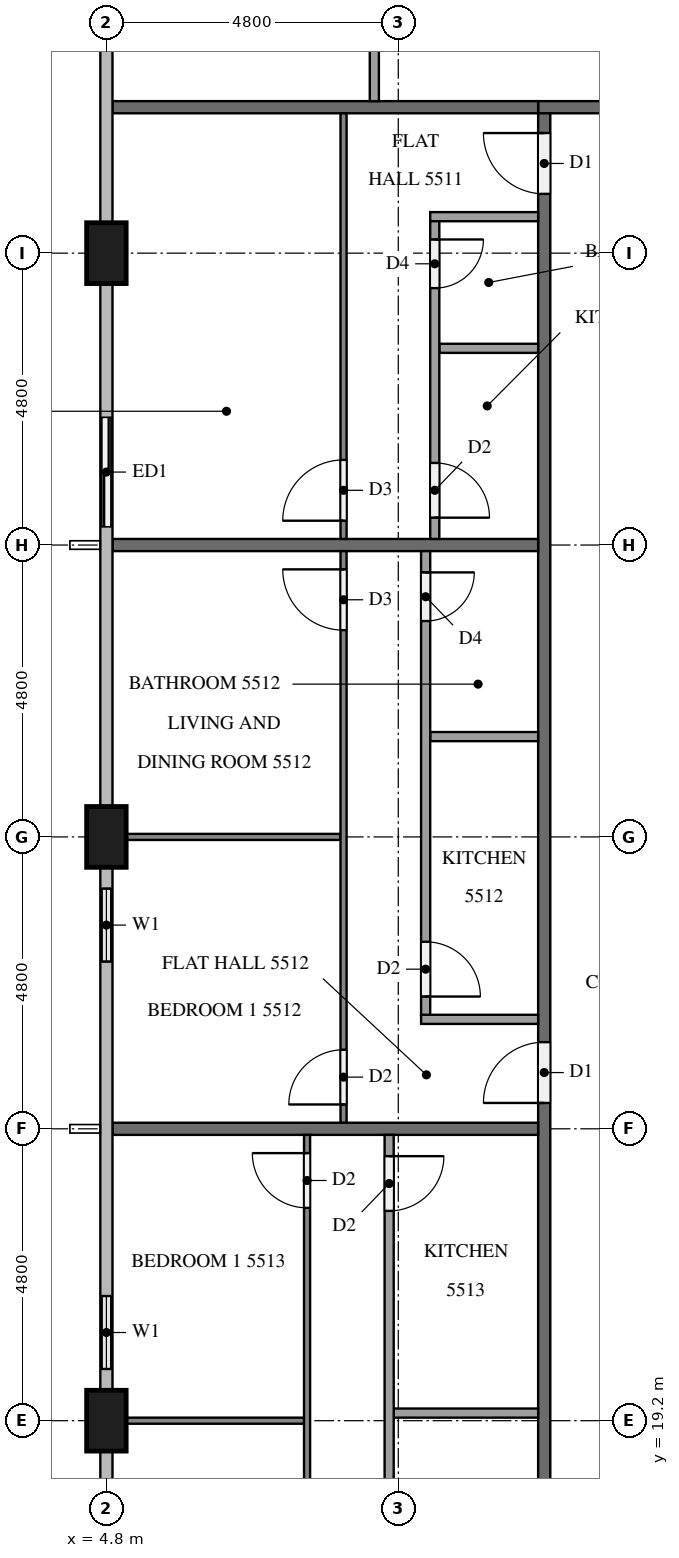
"""IFC4 building model, lengths in metres.
Left out: names, types, materials, properties, quantities, classifications, styles, units other than length and angle.
Written with IfcOpenShell. Run it as: python <this file> out.ifc"""

import sys

from ifc_helpers import new_model, si_unit, direction, frame, frame_2d, origin, origin_2d, place, context, subcontext, project, spatial, rectangle, extrude, element, fill, save


model = new_model("IFC4")
c1 = context("Model", 3, precision=1e-05, world=origin(), true_north=direction((0.0, 1.0)))
c2 = subcontext(c1, "Body", "Model", "MODEL_VIEW")
j1 = project(units=[si_unit("LENGTHUNIT", "METRE"), si_unit("PLANEANGLEUNIT", "RADIAN")], contexts=[c1])
p1 = place(None, origin())
s1 = spatial("IfcSite", under=j1, at=p1, CompositionType="ELEMENT")
p2 = place(p1, origin())
s2 = spatial("IfcBuilding", under=s1, at=p2, CompositionType="ELEMENT")
p3 = place(p2, frame((0.0, 0.0, 212.3)))
s3 = spatial("IfcBuildingStorey", under=s2, at=p3, CompositionType="ELEMENT", Elevation=212.3)
for number, where, z_axis, x_axis in (
    (1, (4.8, 38.4, 0.0), (0.0, 0.0, 1.0), (0.0, 1.0, 0.0)),
    (2, (4.8, 28.8, 0.0), (0.0, 0.0, 1.0), (0.0, 1.0, 0.0)),
    (3, (4.8, 19.2, 0.0), (0.0, 0.0, 1.0), (0.0, 1.0, 0.0)),
):
    element("IfcColumn", number, at=place(p3, frame(where, z_axis=z_axis, x_axis=x_axis)), inside=s3, PredefinedType="COLUMN", context=c2, shape_type="SweptSolid", body=[
        extrude(rectangle(XDim=1.0, YDim=0.65, at=origin_2d()), origin(), (0.0, 0.0, 1.0), 3.2),
    ])
p4 = place(p3, frame((4.8, 36.0, 0.0), z_axis=(0.0, 0.0, 1.0), x_axis=(0.0, -1.0, 0.0)))
e4 = element("IfcWall", 4, at=p4, inside=s3, PredefinedType="SOLIDWALL", context=c2, shape_type="SweptSolid", body=[
    extrude(rectangle(XDim=2.4, YDim=0.15, at=frame_2d((1.2, 0.0))), origin(), (0.0, 0.0, 1.0), 3.2),
])
p5 = place(p4, frame((0.3, 0.0, 0.0)))
e5 = element("IfcOpeningElement", 5, at=p5, cuts=e4, PredefinedType="OPENING", context=c2, shape_type="SweptSolid", body=[
    extrude(rectangle(XDim=1.8, YDim=2.4, at=frame_2d((0.9, 1.2))), frame((0.0, 0.085, 0.0), z_axis=(0.0, -1.0, 0.0), x_axis=(1.0, 0.0, 0.0)), (0.0, 0.0, 1.0), 0.17),
])
p6 = place(p3, frame((4.8, 28.3, 0.0), z_axis=(0.0, 0.0, 1.0), x_axis=(0.0, -1.0, 0.0)))
e6 = element("IfcWall", 6, at=p6, inside=s3, PredefinedType="SOLIDWALL", context=c2, shape_type="SweptSolid", body=[
    extrude(rectangle(XDim=1.9, YDim=0.15, at=frame_2d((0.95, 0.0))), origin(), (0.0, 0.0, 1.0), 3.2),
])
p7 = place(p6, frame((0.35, 0.0, 0.9)))
e7 = element("IfcOpeningElement", 7, at=p7, cuts=e6, PredefinedType="OPENING", context=c2, shape_type="SweptSolid", body=[
    extrude(rectangle(XDim=1.2, YDim=1.4, at=frame_2d((0.6, 0.7))), frame((0.0, 0.085, 0.0), z_axis=(0.0, -1.0, 0.0), x_axis=(1.0, 0.0, 0.0)), (0.0, 0.0, 1.0), 0.17),
])
p8 = place(p3, frame((4.8, 21.6, 0.0), z_axis=(0.0, 0.0, 1.0), x_axis=(0.0, -1.0, 0.0)))
e8 = element("IfcWall", 8, at=p8, inside=s3, PredefinedType="SOLIDWALL", context=c2, shape_type="SweptSolid", body=[
    extrude(rectangle(XDim=1.9, YDim=0.15, at=frame_2d((0.95, 0.0))), origin(), (0.0, 0.0, 1.0), 3.2),
])
p9 = place(p8, frame((0.35, 0.0, 0.9)))
e9 = element("IfcOpeningElement", 9, at=p9, cuts=e8, PredefinedType="OPENING", context=c2, shape_type="SweptSolid", body=[
    extrude(rectangle(XDim=1.2, YDim=1.4, at=frame_2d((0.6, 0.7))), frame((0.0, 0.085, 0.0), z_axis=(0.0, -1.0, 0.0), x_axis=(1.0, 0.0, 0.0)), (0.0, 0.0, 1.0), 0.17),
])
p10 = place(p3, frame((11.9, 40.8, 0.0), z_axis=(0.0, 0.0, 1.0), x_axis=(1.0, 0.0, 0.0)))
e10 = element("IfcWall", 10, at=p10, inside=s3, PredefinedType="PARTITIONING", context=c2, shape_type="SweptSolid", body=[
    extrude(rectangle(XDim=38.6, YDim=0.2, at=frame_2d((19.3, 0.0))), origin(), (0.0, 0.0, 1.0), 3.2),
])
p11 = place(p10, frame((36.525, 0.0, 0.0)))
e11 = element("IfcOpeningElement", 11, at=p11, cuts=e10, PredefinedType="OPENING", context=c2, shape_type="SweptSolid", body=[
    extrude(rectangle(XDim=1.0, YDim=2.1, at=frame_2d((0.5, 1.05))), frame((0.0, 0.11, 0.0), z_axis=(0.0, -1.0, 0.0), x_axis=(1.0, 0.0, 0.0)), (0.0, 0.0, 1.0), 0.22),
])
p12 = place(p10, frame((29.325, 0.0, 0.0)))
e12 = element("IfcOpeningElement", 12, at=p12, cuts=e10, PredefinedType="OPENING", context=c2, shape_type="SweptSolid", body=[
    extrude(rectangle(XDim=1.0, YDim=2.1, at=frame_2d((0.5, 1.05))), frame((0.0, 0.11, 0.0), z_axis=(0.0, -1.0, 0.0), x_axis=(1.0, 0.0, 0.0)), (0.0, 0.0, 1.0), 0.22),
])
p13 = place(p10, frame((12.525, 0.0, 0.0)))
e13 = element("IfcOpeningElement", 13, at=p13, cuts=e10, PredefinedType="OPENING", context=c2, shape_type="SweptSolid", body=[
    extrude(rectangle(XDim=1.0, YDim=2.1, at=frame_2d((0.5, 1.05))), frame((0.0, 0.11, 0.0), z_axis=(0.0, -1.0, 0.0), x_axis=(1.0, 0.0, 0.0)), (0.0, 0.0, 1.0), 0.22),
])
p14 = place(p10, frame((10.625, 0.0, 0.0)))
e14 = element("IfcOpeningElement", 14, at=p14, cuts=e10, PredefinedType="OPENING", context=c2, shape_type="SweptSolid", body=[
    extrude(rectangle(XDim=1.1, YDim=2.1, at=frame_2d((0.55, 1.05))), frame((0.0, 0.11, 0.0), z_axis=(0.0, -1.0, 0.0), x_axis=(1.0, 0.0, 0.0)), (0.0, 0.0, 1.0), 0.22),
])
p15 = place(p3, frame((12.0, 12.1, 0.0), z_axis=(0.0, 0.0, 1.0), x_axis=(0.0, 1.0, 0.0)))
e15 = element("IfcWall", 15, at=p15, inside=s3, PredefinedType="PARTITIONING", context=c2, shape_type="SweptSolid", body=[
    extrude(rectangle(XDim=28.6, YDim=0.2, at=frame_2d((14.3, 0.0))), origin(), (0.0, 0.0, 1.0), 3.2),
])
p16 = place(p15, frame((27.275, 0.0, 0.0)))
e16 = element("IfcOpeningElement", 16, at=p16, cuts=e15, PredefinedType="OPENING", context=c2, shape_type="SweptSolid", body=[
    extrude(rectangle(XDim=1.0, YDim=2.1, at=frame_2d((0.5, 1.05))), frame((0.0, 0.11, 0.0), z_axis=(0.0, -1.0, 0.0), x_axis=(1.0, 0.0, 0.0)), (0.0, 0.0, 1.0), 0.22),
])
p17 = place(p15, frame((12.325, 0.0, 0.0)))
e17 = element("IfcOpeningElement", 17, at=p17, cuts=e15, PredefinedType="OPENING", context=c2, shape_type="SweptSolid", body=[
    extrude(rectangle(XDim=1.0, YDim=2.1, at=frame_2d((0.5, 1.05))), frame((0.0, 0.11, 0.0), z_axis=(0.0, -1.0, 0.0), x_axis=(1.0, 0.0, 0.0)), (0.0, 0.0, 1.0), 0.22),
])
p18 = place(p15, frame((2.725, 0.0, 0.0)))
e18 = element("IfcOpeningElement", 18, at=p18, cuts=e15, PredefinedType="OPENING", context=c2, shape_type="SweptSolid", body=[
    extrude(rectangle(XDim=1.0, YDim=2.1, at=frame_2d((0.5, 1.05))), frame((0.0, 0.11, 0.0), z_axis=(0.0, -1.0, 0.0), x_axis=(1.0, 0.0, 0.0)), (0.0, 0.0, 1.0), 0.22),
])
p19 = place(p15, frame((0.875, 0.0, 0.0)))
e19 = element("IfcOpeningElement", 19, at=p19, cuts=e15, PredefinedType="OPENING", context=c2, shape_type="SweptSolid", body=[
    extrude(rectangle(XDim=1.0, YDim=2.1, at=frame_2d((0.5, 1.05))), frame((0.0, 0.11, 0.0), z_axis=(0.0, -1.0, 0.0), x_axis=(1.0, 0.0, 0.0)), (0.0, 0.0, 1.0), 0.22),
])
for number, where, z_axis, x_axis in (
    (20, (4.9, 40.8, 0.0), (0.0, 0.0, 1.0), (1.0, 0.0, 0.0)),
    (21, (4.9, 33.6, 0.0), (0.0, 0.0, 1.0), (1.0, 0.0, 0.0)),
    (22, (4.9, 24.0, 0.0), (0.0, 0.0, 1.0), (1.0, 0.0, 0.0)),
):
    element("IfcWall", number, at=place(p3, frame(where, z_axis=z_axis, x_axis=x_axis)), inside=s3, PredefinedType="PARTITIONING", context=c2, shape_type="SweptSolid", body=[
        extrude(rectangle(XDim=7.0, YDim=0.2, at=frame_2d((3.5, 0.0))), origin(), (0.0, 0.0, 1.0), 3.2),
    ])
p20 = place(p3, frame((9.206, 40.9, 0.0), z_axis=(0.0, 0.0, 1.0), x_axis=(0.0, 1.0, 0.0)))
e23 = element("IfcWall", 23, at=p20, inside=s3, PredefinedType="PARTITIONING", context=c2, shape_type="SweptSolid", body=[
    extrude(rectangle(XDim=3.125, YDim=0.15, at=frame_2d((1.562, 0.0))), origin(), (0.0, 0.0, 1.0), 3.2),
])
p21 = place(p3, frame((8.7, 33.7, 0.0), z_axis=(0.0, 0.0, 1.0), x_axis=(0.0, 1.0, 0.0)))
e24 = element("IfcWall", 24, at=p21, inside=s3, PredefinedType="PARTITIONING", context=c2, shape_type="SweptSolid", body=[
    extrude(rectangle(XDim=7.0, YDim=0.1, at=frame_2d((3.5, 0.0))), origin(), (0.0, 0.0, 1.0), 3.2),
])
p22 = place(p21, frame((0.3, 0.0, 0.0)))
e25 = element("IfcOpeningElement", 25, at=p22, cuts=e24, PredefinedType="OPENING", context=c2, shape_type="SweptSolid", body=[
    extrude(rectangle(XDim=1.0, YDim=2.1, at=frame_2d((0.5, 1.05))), frame((0.0, 0.06, 0.0), z_axis=(0.0, -1.0, 0.0), x_axis=(1.0, 0.0, 0.0)), (0.0, 0.0, 1.0), 0.12),
])
p23 = place(p3, frame((11.9, 36.835, 0.0), z_axis=(0.0, 0.0, 1.0), x_axis=(-1.0, 0.0, 0.0)))
e26 = element("IfcWall", 26, at=p23, inside=s3, PredefinedType="PARTITIONING", context=c2, shape_type="SweptSolid", body=[
    extrude(rectangle(XDim=1.625, YDim=0.15, at=frame_2d((0.812, 0.0))), origin(), (0.0, 0.0, 1.0), 3.2),
])
p24 = place(p3, frame((11.9, 39.0, 0.0), z_axis=(0.0, 0.0, 1.0), x_axis=(-1.0, 0.0, 0.0)))
e27 = element("IfcWall", 27, at=p24, inside=s3, PredefinedType="PARTITIONING", context=c2, shape_type="SweptSolid", body=[
    extrude(rectangle(XDim=1.775, YDim=0.15, at=frame_2d((0.887, 0.0))), origin(), (0.0, 0.0, 1.0), 3.2),
])
p25 = place(p3, frame((10.2, 38.925, 0.0), z_axis=(0.0, 0.0, 1.0), x_axis=(0.0, -1.0, 0.0)))
e28 = element("IfcWall", 28, at=p25, inside=s3, PredefinedType="PARTITIONING", context=c2, shape_type="SweptSolid", body=[
    extrude(rectangle(XDim=5.225, YDim=0.15, at=frame_2d((2.613, 0.0))), origin(), (0.0, 0.0, 1.0), 3.2),
])
p26 = place(p25, frame((0.3, 0.0, 0.0)))
e29 = element("IfcOpeningElement", 29, at=p26, cuts=e28, PredefinedType="OPENING", context=c2, shape_type="SweptSolid", body=[
    extrude(rectangle(XDim=0.8, YDim=2.1, at=frame_2d((0.4, 1.05))), frame((0.0, 0.085, 0.0), z_axis=(0.0, -1.0, 0.0), x_axis=(1.0, 0.0, 0.0)), (0.0, 0.0, 1.0), 0.17),
])
p27 = place(p25, frame((3.975, 0.0, 0.0)))
e30 = element("IfcOpeningElement", 30, at=p27, cuts=e28, PredefinedType="OPENING", context=c2, shape_type="SweptSolid", body=[
    extrude(rectangle(XDim=0.9, YDim=2.1, at=frame_2d((0.45, 1.05))), frame((0.0, 0.085, 0.0), z_axis=(0.0, -1.0, 0.0), x_axis=(1.0, 0.0, 0.0)), (0.0, 0.0, 1.0), 0.17),
])
p28 = place(p3, frame((8.65, 28.8, 0.0), z_axis=(0.0, 0.0, 1.0), x_axis=(-1.0, 0.0, 0.0)))
e31 = element("IfcWall", 31, at=p28, inside=s3, PredefinedType="PARTITIONING", context=c2, shape_type="SweptSolid", body=[
    extrude(rectangle(XDim=3.525, YDim=0.1, at=frame_2d((1.762, 0.0))), origin(), (0.0, 0.0, 1.0), 3.2),
])
p29 = place(p3, frame((8.7, 24.1, 0.0), z_axis=(0.0, 0.0, 1.0), x_axis=(0.0, 1.0, 0.0)))
e32 = element("IfcWall", 32, at=p29, inside=s3, PredefinedType="PARTITIONING", context=c2, shape_type="SweptSolid", body=[
    extrude(rectangle(XDim=9.4, YDim=0.1, at=frame_2d((4.7, 0.0))), origin(), (0.0, 0.0, 1.0), 3.2),
])
p30 = place(p29, frame((0.3, 0.0, 0.0)))
e33 = element("IfcOpeningElement", 33, at=p30, cuts=e32, PredefinedType="OPENING", context=c2, shape_type="SweptSolid", body=[
    extrude(rectangle(XDim=0.9, YDim=2.1, at=frame_2d((0.45, 1.05))), frame((0.0, 0.06, 0.0), z_axis=(0.0, -1.0, 0.0), x_axis=(1.0, 0.0, 0.0)), (0.0, 0.0, 1.0), 0.12),
])
p31 = place(p29, frame((8.1, 0.0, 0.0)))
e34 = element("IfcOpeningElement", 34, at=p31, cuts=e32, PredefinedType="OPENING", context=c2, shape_type="SweptSolid", body=[
    extrude(rectangle(XDim=1.0, YDim=2.1, at=frame_2d((0.5, 1.05))), frame((0.0, 0.06, 0.0), z_axis=(0.0, -1.0, 0.0), x_axis=(1.0, 0.0, 0.0)), (0.0, 0.0, 1.0), 0.12),
])
p32 = place(p3, frame((11.9, 30.45, 0.0), z_axis=(0.0, 0.0, 1.0), x_axis=(-1.0, 0.0, 0.0)))
e35 = element("IfcWall", 35, at=p32, inside=s3, PredefinedType="PARTITIONING", context=c2, shape_type="SweptSolid", body=[
    extrude(rectangle(XDim=1.775, YDim=0.15, at=frame_2d((0.887, 0.0))), origin(), (0.0, 0.0, 1.0), 3.2),
])
p33 = place(p3, frame((11.9, 25.8, 0.0), z_axis=(0.0, 0.0, 1.0), x_axis=(-1.0, 0.0, 0.0)))
e36 = element("IfcWall", 36, at=p33, inside=s3, PredefinedType="PARTITIONING", context=c2, shape_type="SweptSolid", body=[
    extrude(rectangle(XDim=1.925, YDim=0.15, at=frame_2d((0.962, 0.0))), origin(), (0.0, 0.0, 1.0), 3.2),
])
p34 = place(p3, frame((10.05, 33.5, 0.0), z_axis=(0.0, 0.0, 1.0), x_axis=(0.0, -1.0, 0.0)))
e37 = element("IfcWall", 37, at=p34, inside=s3, PredefinedType="PARTITIONING", context=c2, shape_type="SweptSolid", body=[
    extrude(rectangle(XDim=7.625, YDim=0.15, at=frame_2d((3.812, 0.0))), origin(), (0.0, 0.0, 1.0), 3.2),
])
p35 = place(p34, frame((6.425, 0.0, 0.0)))
e38 = element("IfcOpeningElement", 38, at=p35, cuts=e37, PredefinedType="OPENING", context=c2, shape_type="SweptSolid", body=[
    extrude(rectangle(XDim=0.9, YDim=2.1, at=frame_2d((0.45, 1.05))), frame((0.0, 0.085, 0.0), z_axis=(0.0, -1.0, 0.0), x_axis=(1.0, 0.0, 0.0)), (0.0, 0.0, 1.0), 0.17),
])
p36 = place(p34, frame((0.35, 0.0, 0.0)))
e39 = element("IfcOpeningElement", 39, at=p36, cuts=e37, PredefinedType="OPENING", context=c2, shape_type="SweptSolid", body=[
    extrude(rectangle(XDim=0.8, YDim=2.1, at=frame_2d((0.4, 1.05))), frame((0.0, 0.085, 0.0), z_axis=(0.0, -1.0, 0.0), x_axis=(1.0, 0.0, 0.0)), (0.0, 0.0, 1.0), 0.17),
])
p37 = place(p3, frame((8.05, 19.2, 0.0), z_axis=(0.0, 0.0, 1.0), x_axis=(-1.0, 0.0, 0.0)))
e40 = element("IfcWall", 40, at=p37, inside=s3, PredefinedType="PARTITIONING", context=c2, shape_type="SweptSolid", body=[
    extrude(rectangle(XDim=2.925, YDim=0.1, at=frame_2d((1.462, 0.0))), origin(), (0.0, 0.0, 1.0), 3.2),
])
p38 = place(p3, frame((8.1, 14.5, 0.0), z_axis=(0.0, 0.0, 1.0), x_axis=(0.0, 1.0, 0.0)))
e41 = element("IfcWall", 41, at=p38, inside=s3, PredefinedType="PARTITIONING", context=c2, shape_type="SweptSolid", body=[
    extrude(rectangle(XDim=9.4, YDim=0.1, at=frame_2d((4.7, 0.0))), origin(), (0.0, 0.0, 1.0), 3.2),
])
p39 = place(p38, frame((0.3, 0.0, 0.0)))
e42 = element("IfcOpeningElement", 42, at=p39, cuts=e41, PredefinedType="OPENING", context=c2, shape_type="SweptSolid", body=[
    extrude(rectangle(XDim=1.0, YDim=2.1, at=frame_2d((0.5, 1.05))), frame((0.0, 0.06, 0.0), z_axis=(0.0, -1.0, 0.0), x_axis=(1.0, 0.0, 0.0)), (0.0, 0.0, 1.0), 0.12),
])
p40 = place(p38, frame((8.2, 0.0, 0.0)))
e43 = element("IfcOpeningElement", 43, at=p40, cuts=e41, PredefinedType="OPENING", context=c2, shape_type="SweptSolid", body=[
    extrude(rectangle(XDim=0.9, YDim=2.1, at=frame_2d((0.45, 1.05))), frame((0.0, 0.06, 0.0), z_axis=(0.0, -1.0, 0.0), x_axis=(1.0, 0.0, 0.0)), (0.0, 0.0, 1.0), 0.12),
])
p41 = place(p3, frame((11.9, 19.325, 0.0), z_axis=(0.0, 0.0, 1.0), x_axis=(-1.0, 0.0, 0.0)))
e44 = element("IfcWall", 44, at=p41, inside=s3, PredefinedType="PARTITIONING", context=c2, shape_type="SweptSolid", body=[
    extrude(rectangle(XDim=2.375, YDim=0.15, at=frame_2d((1.188, 0.0))), origin(), (0.0, 0.0, 1.0), 3.2),
])
p42 = place(p3, frame((9.45, 23.9, 0.0), z_axis=(0.0, 0.0, 1.0), x_axis=(0.0, -1.0, 0.0)))
e45 = element("IfcWall", 45, at=p42, inside=s3, PredefinedType="PARTITIONING", context=c2, shape_type="SweptSolid", body=[
    extrude(rectangle(XDim=7.625, YDim=0.15, at=frame_2d((3.812, 0.0))), origin(), (0.0, 0.0, 1.0), 3.2),
])
p43 = place(p42, frame((6.525, 0.0, 0.0)))
e46 = element("IfcOpeningElement", 46, at=p43, cuts=e45, PredefinedType="OPENING", context=c2, shape_type="SweptSolid", body=[
    extrude(rectangle(XDim=0.8, YDim=2.1, at=frame_2d((0.4, 1.05))), frame((0.0, 0.085, 0.0), z_axis=(0.0, -1.0, 0.0), x_axis=(1.0, 0.0, 0.0)), (0.0, 0.0, 1.0), 0.17),
])
p44 = place(p42, frame((0.35, 0.0, 0.0)))
e47 = element("IfcOpeningElement", 47, at=p44, cuts=e45, PredefinedType="OPENING", context=c2, shape_type="SweptSolid", body=[
    extrude(rectangle(XDim=0.9, YDim=2.1, at=frame_2d((0.45, 1.05))), frame((0.0, 0.085, 0.0), z_axis=(0.0, -1.0, 0.0), x_axis=(1.0, 0.0, 0.0)), (0.0, 0.0, 1.0), 0.17),
])
p45 = place(p5, origin())
e48 = element("IfcDoor", 48, at=p45, inside=s3, OperationType="SLIDING_TO_LEFT", PredefinedType="DOOR", context=c2, shape_type="SweptSolid", body=[
    extrude(rectangle(XDim=1.8, YDim=2.4, at=frame_2d((0.9, 1.2))), frame((0.0, 0.025, 0.0), z_axis=(0.0, -1.0, 0.0), x_axis=(1.0, 0.0, 0.0)), (0.0, 0.0, 1.0), 0.05),
])
fill(e5, e48)
p46 = place(p7, origin())
e49 = element("IfcWindow", 49, at=p46, inside=s3, PartitioningType="SINGLE_PANEL", PredefinedType="WINDOW", context=c2, shape_type="SweptSolid", body=[
    extrude(rectangle(XDim=1.2, YDim=1.4, at=frame_2d((0.6, 0.7))), frame((0.0, 0.03, 0.0), z_axis=(0.0, -1.0, 0.0), x_axis=(1.0, 0.0, 0.0)), (0.0, 0.0, 1.0), 0.06),
])
fill(e7, e49)
p47 = place(p9, origin())
e50 = element("IfcWindow", 50, at=p47, inside=s3, PartitioningType="SINGLE_PANEL", PredefinedType="WINDOW", context=c2, shape_type="SweptSolid", body=[
    extrude(rectangle(XDim=1.2, YDim=1.4, at=frame_2d((0.6, 0.7))), frame((0.0, 0.03, 0.0), z_axis=(0.0, -1.0, 0.0), x_axis=(1.0, 0.0, 0.0)), (0.0, 0.0, 1.0), 0.06),
])
fill(e9, e50)
p48 = place(p16, origin())
e51 = element("IfcDoor", 51, at=p48, inside=s3, OperationType="SINGLE_SWING_RIGHT", PredefinedType="DOOR", context=c2, shape_type="SweptSolid", body=[
    extrude(rectangle(XDim=1.0, YDim=2.1, at=frame_2d((0.5, 1.05))), frame((0.0, 0.025, 0.0), z_axis=(0.0, -1.0, 0.0), x_axis=(1.0, 0.0, 0.0)), (0.0, 0.0, 1.0), 0.05),
])
fill(e16, e51)
p49 = place(p17, origin())
e52 = element("IfcDoor", 52, at=p49, inside=s3, OperationType="SINGLE_SWING_LEFT", PredefinedType="DOOR", context=c2, shape_type="SweptSolid", body=[
    extrude(rectangle(XDim=1.0, YDim=2.1, at=frame_2d((0.5, 1.05))), frame((0.0, 0.025, 0.0), z_axis=(0.0, -1.0, 0.0), x_axis=(1.0, 0.0, 0.0)), (0.0, 0.0, 1.0), 0.05),
])
fill(e17, e52)
p50 = place(p22, origin())
e53 = element("IfcDoor", 53, at=p50, inside=s3, OperationType="SINGLE_SWING_LEFT", PredefinedType="DOOR", context=c2, shape_type="SweptSolid", body=[
    extrude(rectangle(XDim=1.0, YDim=2.1, at=frame_2d((0.5, 1.05))), frame((0.0, 0.025, 0.0), z_axis=(0.0, -1.0, 0.0), x_axis=(1.0, 0.0, 0.0)), (0.0, 0.0, 1.0), 0.05),
])
fill(e25, e53)
p51 = place(p26, origin())
e54 = element("IfcDoor", 54, at=p51, inside=s3, OperationType="SINGLE_SWING_LEFT", PredefinedType="DOOR", context=c2, shape_type="SweptSolid", body=[
    extrude(rectangle(XDim=0.8, YDim=2.1, at=frame_2d((0.4, 1.05))), frame((0.0, 0.025, 0.0), z_axis=(0.0, -1.0, 0.0), x_axis=(1.0, 0.0, 0.0)), (0.0, 0.0, 1.0), 0.05),
])
fill(e29, e54)
p52 = place(p27, origin())
e55 = element("IfcDoor", 55, at=p52, inside=s3, OperationType="SINGLE_SWING_RIGHT", PredefinedType="DOOR", context=c2, shape_type="SweptSolid", body=[
    extrude(rectangle(XDim=0.9, YDim=2.1, at=frame_2d((0.45, 1.05))), frame((0.0, 0.025, 0.0), z_axis=(0.0, -1.0, 0.0), x_axis=(1.0, 0.0, 0.0)), (0.0, 0.0, 1.0), 0.05),
])
fill(e30, e55)
p53 = place(p30, origin())
e56 = element("IfcDoor", 56, at=p53, inside=s3, OperationType="SINGLE_SWING_LEFT", PredefinedType="DOOR", context=c2, shape_type="SweptSolid", body=[
    extrude(rectangle(XDim=0.9, YDim=2.1, at=frame_2d((0.45, 1.05))), frame((0.0, 0.025, 0.0), z_axis=(0.0, -1.0, 0.0), x_axis=(1.0, 0.0, 0.0)), (0.0, 0.0, 1.0), 0.05),
])
fill(e33, e56)
p54 = place(p31, origin())
e57 = element("IfcDoor", 57, at=p54, inside=s3, OperationType="SINGLE_SWING_RIGHT", PredefinedType="DOOR", context=c2, shape_type="SweptSolid", body=[
    extrude(rectangle(XDim=1.0, YDim=2.1, at=frame_2d((0.5, 1.05))), frame((0.0, 0.025, 0.0), z_axis=(0.0, -1.0, 0.0), x_axis=(1.0, 0.0, 0.0)), (0.0, 0.0, 1.0), 0.05),
])
fill(e34, e57)
p55 = place(p35, origin())
e58 = element("IfcDoor", 58, at=p55, inside=s3, OperationType="SINGLE_SWING_RIGHT", PredefinedType="DOOR", context=c2, shape_type="SweptSolid", body=[
    extrude(rectangle(XDim=0.9, YDim=2.1, at=frame_2d((0.45, 1.05))), frame((0.0, 0.025, 0.0), z_axis=(0.0, -1.0, 0.0), x_axis=(1.0, 0.0, 0.0)), (0.0, 0.0, 1.0), 0.05),
])
fill(e38, e58)
p56 = place(p36, origin())
e59 = element("IfcDoor", 59, at=p56, inside=s3, OperationType="SINGLE_SWING_LEFT", PredefinedType="DOOR", context=c2, shape_type="SweptSolid", body=[
    extrude(rectangle(XDim=0.8, YDim=2.1, at=frame_2d((0.4, 1.05))), frame((0.0, 0.025, 0.0), z_axis=(0.0, -1.0, 0.0), x_axis=(1.0, 0.0, 0.0)), (0.0, 0.0, 1.0), 0.05),
])
fill(e39, e59)
p57 = place(p40, origin())
e60 = element("IfcDoor", 60, at=p57, inside=s3, OperationType="SINGLE_SWING_RIGHT", PredefinedType="DOOR", context=c2, shape_type="SweptSolid", body=[
    extrude(rectangle(XDim=0.9, YDim=2.1, at=frame_2d((0.45, 1.05))), frame((0.0, 0.025, 0.0), z_axis=(0.0, -1.0, 0.0), x_axis=(1.0, 0.0, 0.0)), (0.0, 0.0, 1.0), 0.05),
])
fill(e43, e60)
p58 = place(p44, origin())
e61 = element("IfcDoor", 61, at=p58, inside=s3, OperationType="SINGLE_SWING_LEFT", PredefinedType="DOOR", context=c2, shape_type="SweptSolid", body=[
    extrude(rectangle(XDim=0.9, YDim=2.1, at=frame_2d((0.45, 1.05))), frame((0.0, 0.025, 0.0), z_axis=(0.0, -1.0, 0.0), x_axis=(1.0, 0.0, 0.0)), (0.0, 0.0, 1.0), 0.05),
])
fill(e47, e61)
save(model, sys.argv[1])
